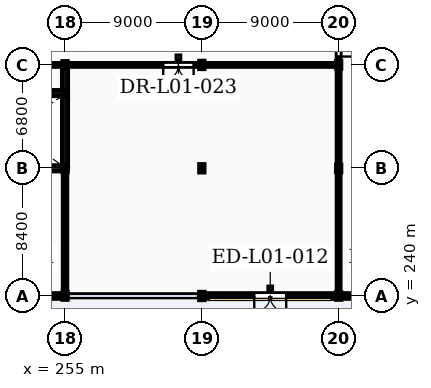
"""IFC4 building model, lengths in metres.
Left out: names, types, materials, properties, quantities, classifications, styles, units other than length and angle.
Written with IfcOpenShell. Run it as: python <this file> out.ifc"""

import sys

from ifc_helpers import new_model, si_unit, direction, frame, frame_2d, origin, origin_2d, place, context, subcontext, project, spatial, rectangle, i_section, extrude, element, fill, save


model = new_model("IFC4")
c1 = context("Model", 3, precision=1e-05, world=origin(), true_north=direction((0.0, 1.0)))
c2 = subcontext(c1, "Body", "Model", "MODEL_VIEW")
j1 = project(units=[si_unit("LENGTHUNIT", "METRE"), si_unit("PLANEANGLEUNIT", "RADIAN")], contexts=[c1])
p1 = place(None, origin())
s1 = spatial("IfcSite", under=j1, at=p1, CompositionType="ELEMENT")
p2 = place(p1, origin())
s2 = spatial("IfcBuilding", under=s1, at=p2, CompositionType="ELEMENT")
p3 = place(p2, origin())
s3 = spatial("IfcBuildingStorey", under=s2, at=p3, CompositionType="ELEMENT", Elevation=0.0)
for number, where, z_axis, x_axis in (
    (1, (255.0, 240.0, 0.0), (0.0, 0.0, 1.0), (1.0, 0.0, 0.0)),
    (2, (255.0, 248.4, 0.0), (0.0, 0.0, 1.0), (1.0, 0.0, 0.0)),
    (3, (255.0, 255.2, 0.0), (0.0, 0.0, 1.0), (1.0, 0.0, 0.0)),
):
    element("IfcColumn", number, at=place(p3, frame(where, z_axis=z_axis, x_axis=x_axis)), inside=s3, PredefinedType="COLUMN", context=c2, shape_type="SweptSolid", body=[
        extrude(i_section(OverallWidth=0.3, OverallDepth=0.45, WebThickness=0.014, FlangeThickness=0.026, FilletRadius=0.027, at=origin_2d()), origin(), (0.0, 0.0, 1.0), 5.4),
    ])
for number, where, z_axis, x_axis in (
    (4, (264.0, 240.0, 0.0), (0.0, 0.0, 1.0), (1.0, 0.0, 0.0)),
    (5, (264.0, 248.4, 0.0), (0.0, 0.0, 1.0), (1.0, 0.0, 0.0)),
    (6, (264.0, 255.2, 0.0), (0.0, 0.0, 1.0), (1.0, 0.0, 0.0)),
):
    element("IfcColumn", number, at=place(p3, frame(where, z_axis=z_axis, x_axis=x_axis)), inside=s3, PredefinedType="COLUMN", context=c2, shape_type="SweptSolid", body=[
        extrude(i_section(OverallWidth=0.3, OverallDepth=0.5, WebThickness=0.014, FlangeThickness=0.028, FilletRadius=0.027, at=origin_2d()), origin(), (0.0, 0.0, 1.0), 5.4),
    ])
for number, where, z_axis, x_axis in (
    (7, (273.0, 240.0, 0.0), (0.0, 0.0, 1.0), (1.0, 0.0, 0.0)),
    (8, (273.0, 248.4, 0.0), (0.0, 0.0, 1.0), (1.0, 0.0, 0.0)),
    (9, (273.0, 255.2, 0.0), (0.0, 0.0, 1.0), (1.0, 0.0, 0.0)),
):
    element("IfcColumn", number, at=place(p3, frame(where, z_axis=z_axis, x_axis=x_axis)), inside=s3, PredefinedType="COLUMN", context=c2, shape_type="SweptSolid", body=[
        extrude(i_section(OverallWidth=0.3, OverallDepth=0.45, WebThickness=0.014, FlangeThickness=0.026, FilletRadius=0.027, at=origin_2d()), origin(), (0.0, 0.0, 1.0), 5.4),
    ])
p4 = place(p3, frame((246.006, 240.0, 0.0), z_axis=(0.0, 0.0, 1.0), x_axis=(1.0, 0.0, 0.0)))
e10 = element("IfcWall", 10, at=p4, inside=s3, PredefinedType="SOLIDWALL", context=c2, shape_type="SweptSolid", body=[
    extrude(rectangle(XDim=8.988, YDim=0.32, at=frame_2d((4.494, 0.0))), origin(), (0.0, 0.0, 1.0), 4.798),
])
p5 = place(p4, frame((3.444, 0.0, 0.0)))
e11 = element("IfcOpeningElement", 11, at=p5, cuts=e10, PredefinedType="OPENING", context=c2, shape_type="SweptSolid", body=[
    extrude(rectangle(XDim=2.1, YDim=2.7, at=frame_2d((1.05, 1.35))), frame((0.0, 0.175, 0.0), z_axis=(0.0, -1.0, 0.0), x_axis=(1.0, 0.0, 0.0)), (0.0, 0.0, 1.0), 0.35),
])
p6 = place(p3, frame((264.006, 240.0, 0.0), z_axis=(0.0, 0.0, 1.0), x_axis=(1.0, 0.0, 0.0)))
e12 = element("IfcWall", 12, at=p6, inside=s3, PredefinedType="SOLIDWALL", context=c2, shape_type="SweptSolid", body=[
    extrude(rectangle(XDim=8.988, YDim=0.32, at=frame_2d((4.494, 0.0))), origin(), (0.0, 0.0, 1.0), 4.798),
])
p7 = place(p6, frame((3.444, 0.0, 0.0)))
e13 = element("IfcOpeningElement", 13, at=p7, cuts=e12, PredefinedType="OPENING", context=c2, shape_type="SweptSolid", body=[
    extrude(rectangle(XDim=2.1, YDim=2.7, at=frame_2d((1.05, 1.35))), frame((0.0, 0.175, 0.0), z_axis=(0.0, -1.0, 0.0), x_axis=(1.0, 0.0, 0.0)), (0.0, 0.0, 1.0), 0.35),
])
p8 = place(p3, frame((273.006, 240.0, 0.0), z_axis=(0.0, 0.0, 1.0), x_axis=(1.0, 0.0, 0.0)))
e14 = element("IfcWall", 14, at=p8, inside=s3, PredefinedType="SOLIDWALL", context=c2, shape_type="SweptSolid", body=[
    extrude(rectangle(XDim=8.988, YDim=0.32, at=frame_2d((4.494, 0.0))), origin(), (0.0, 0.0, 1.0), 4.798),
])
p9 = place(p8, frame((3.444, 0.0, 0.0)))
e15 = element("IfcOpeningElement", 15, at=p9, cuts=e14, PredefinedType="OPENING", context=c2, shape_type="SweptSolid", body=[
    extrude(rectangle(XDim=2.1, YDim=2.7, at=frame_2d((1.05, 1.35))), frame((0.0, 0.175, 0.0), z_axis=(0.0, -1.0, 0.0), x_axis=(1.0, 0.0, 0.0)), (0.0, 0.0, 1.0), 0.35),
])
p10 = place(p3, frame((120.1, 240.1, 5.4), z_axis=(0.0, 0.0, 1.0), x_axis=(1.0, 0.0, 0.0)))
e16 = element("IfcWall", 16, at=p10, inside=s3, PredefinedType="PARAPET", context=c2, shape_type="SweptSolid", body=[
    extrude(rectangle(XDim=167.8, YDim=0.18, at=frame_2d((83.9, 0.0))), origin(), (0.0, 0.0, 1.0), 1.2),
])
p11 = place(p3, frame((246.0, 248.4, 0.0), z_axis=(0.0, 0.0, 1.0), x_axis=(1.0, 0.0, 0.0)))
e17 = element("IfcWall", 17, at=p11, inside=s3, PredefinedType="SHEAR", context=c2, shape_type="SweptSolid", body=[
    extrude(rectangle(XDim=9.0, YDim=0.35, at=frame_2d((4.5, 0.0))), origin(), (0.0, 0.0, 1.0), 5.14),
])
p12 = place(p11, frame((0.45, 0.0, 0.0)))
e18 = element("IfcOpeningElement", 18, at=p12, cuts=e17, PredefinedType="OPENING", context=c2, shape_type="SweptSolid", body=[
    extrude(rectangle(XDim=1.15, YDim=2.15, at=frame_2d((0.575, 1.075))), frame((0.0, 0.19, 0.0), z_axis=(0.0, -1.0, 0.0), x_axis=(1.0, 0.0, 0.0)), (0.0, 0.0, 1.0), 0.38),
])
p13 = place(p3, frame((255.0, 248.4, 0.0), z_axis=(0.0, 0.0, 1.0), x_axis=(0.0, 1.0, 0.0)))
e19 = element("IfcWall", 19, at=p13, inside=s3, PredefinedType="SHEAR", context=c2, shape_type="SweptSolid", body=[
    extrude(rectangle(XDim=6.8, YDim=0.35, at=frame_2d((3.4, 0.0))), origin(), (0.0, 0.0, 1.0), 5.14),
])
p14 = place(p3, frame((246.0, 253.35, 0.0), z_axis=(0.0, 0.0, 1.0), x_axis=(1.0, 0.0, 0.0)))
e20 = element("IfcWall", 20, at=p14, inside=s3, PredefinedType="SHEAR", context=c2, shape_type="SweptSolid", body=[
    extrude(rectangle(XDim=9.0, YDim=0.35, at=frame_2d((4.5, 0.0))), origin(), (0.0, 0.0, 1.0), 5.14),
])
p15 = place(p14, frame((0.275, 0.0, 0.0)))
e21 = element("IfcOpeningElement", 21, at=p15, cuts=e20, PredefinedType="OPENING", context=c2, shape_type="SweptSolid", body=[
    extrude(rectangle(XDim=1.15, YDim=2.15, at=frame_2d((0.575, 1.075))), frame((0.0, 0.19, 0.0), z_axis=(0.0, -1.0, 0.0), x_axis=(1.0, 0.0, 0.0)), (0.0, 0.0, 1.0), 0.38),
])
p16 = place(p3, frame((246.0, 255.2, 0.0), z_axis=(0.0, 0.0, 1.0), x_axis=(1.0, 0.0, 0.0)))
e22 = element("IfcWall", 22, at=p16, inside=s3, PredefinedType="PARTITIONING", context=c2, shape_type="SweptSolid", body=[
    extrude(rectangle(XDim=9.0, YDim=0.2, at=frame_2d((4.5, 0.0))), origin(), (0.0, 0.0, 1.0), 4.588),
])
p17 = place(p16, frame((3.775, 0.0, 0.0)))
e23 = element("IfcOpeningElement", 23, at=p17, cuts=e22, PredefinedType="OPENING", context=c2, shape_type="SweptSolid", body=[
    extrude(rectangle(XDim=1.45, YDim=2.2, at=frame_2d((0.725, 1.1))), frame((0.0, 0.115, 0.0), z_axis=(0.0, -1.0, 0.0), x_axis=(1.0, 0.0, 0.0)), (0.0, 0.0, 1.0), 0.23),
])
p18 = place(p3, frame((255.0, 240.0, 0.0), z_axis=(0.0, 0.0, 1.0), x_axis=(0.0, 1.0, 0.0)))
e24 = element("IfcWall", 24, at=p18, inside=s3, PredefinedType="PARTITIONING", context=c2, shape_type="SweptSolid", body=[
    extrude(rectangle(XDim=8.4, YDim=0.24, at=frame_2d((4.2, 0.0))), origin(), (0.0, 0.0, 1.0), 4.688),
])
p19 = place(p3, frame((255.0, 255.2, 0.0), z_axis=(0.0, 0.0, 1.0), x_axis=(1.0, 0.0, 0.0)))
e25 = element("IfcWall", 25, at=p19, inside=s3, PredefinedType="PARTITIONING", context=c2, shape_type="SweptSolid", body=[
    extrude(rectangle(XDim=18.0, YDim=0.2, at=frame_2d((9.0, 0.0))), origin(), (0.0, 0.0, 1.0), 4.588),
])
p20 = place(p19, frame((6.46, 0.0, 0.0)))
e26 = element("IfcOpeningElement", 26, at=p20, cuts=e25, PredefinedType="OPENING", context=c2, shape_type="SweptSolid", body=[
    extrude(rectangle(XDim=2.0, YDim=2.4, at=frame_2d((1.0, 1.2))), frame((0.0, 0.115, 0.0), z_axis=(0.0, -1.0, 0.0), x_axis=(1.0, 0.0, 0.0)), (0.0, 0.0, 1.0), 0.23),
])
p21 = place(p3, frame((273.0, 240.0, 0.0), z_axis=(0.0, 0.0, 1.0), x_axis=(0.0, 1.0, 0.0)))
e27 = element("IfcWall", 27, at=p21, inside=s3, PredefinedType="PARTITIONING", context=c2, shape_type="SweptSolid", body=[
    extrude(rectangle(XDim=18.2, YDim=0.2, at=frame_2d((9.1, 0.0))), origin(), (0.0, 0.0, 1.0), 4.688),
])
p22 = place(p21, frame((15.75, 0.0, 0.0)))
e28 = element("IfcOpeningElement", 28, at=p22, cuts=e27, PredefinedType="OPENING", context=c2, shape_type="SweptSolid", body=[
    extrude(rectangle(XDim=1.8, YDim=2.4, at=frame_2d((0.9, 1.2))), frame((0.0, 0.115, 0.0), z_axis=(0.0, -1.0, 0.0), x_axis=(1.0, 0.0, 0.0)), (0.0, 0.0, 1.0), 0.23),
])
p23 = place(p7, frame((2.1, 0.0, 0.0), z_axis=(0.0, 0.0, 1.0), x_axis=(-1.0, 0.0, 0.0)))
e29 = element("IfcDoor", 29, at=p23, inside=s3, OperationType="DOUBLE_DOOR_SINGLE_SWING", PredefinedType="DOOR", context=c2, shape_type="SweptSolid", body=[
    extrude(rectangle(XDim=2.1, YDim=2.7, at=frame_2d((1.05, 1.35))), frame((0.0, 0.025, 0.0), z_axis=(0.0, -1.0, 0.0), x_axis=(1.0, 0.0, 0.0)), (0.0, 0.0, 1.0), 0.05),
])
fill(e13, e29)
p24 = place(p20, frame((2.0, 0.0, 0.0), z_axis=(0.0, 0.0, 1.0), x_axis=(-1.0, 0.0, 0.0)))
e30 = element("IfcDoor", 30, at=p24, inside=s3, OperationType="DOUBLE_DOOR_SINGLE_SWING", PredefinedType="DOOR", context=c2, shape_type="SweptSolid", body=[
    extrude(rectangle(XDim=2.0, YDim=2.4, at=frame_2d((1.0, 1.2))), frame((0.0, 0.025, 0.0), z_axis=(0.0, -1.0, 0.0), x_axis=(1.0, 0.0, 0.0)), (0.0, 0.0, 1.0), 0.05),
])
fill(e26, e30)
p25 = place(p22, frame((1.8, 0.0, 0.0), z_axis=(0.0, 0.0, 1.0), x_axis=(-1.0, 0.0, 0.0)))
e31 = element("IfcDoor", 31, at=p25, inside=s3, OperationType="DOUBLE_DOOR_SINGLE_SWING", PredefinedType="DOOR", context=c2, shape_type="SweptSolid", body=[
    extrude(rectangle(XDim=1.8, YDim=2.4, at=frame_2d((0.9, 1.2))), frame((0.0, 0.025, 0.0), z_axis=(0.0, -1.0, 0.0), x_axis=(1.0, 0.0, 0.0)), (0.0, 0.0, 1.0), 0.05),
])
fill(e28, e31)
save(model, sys.argv[1])
